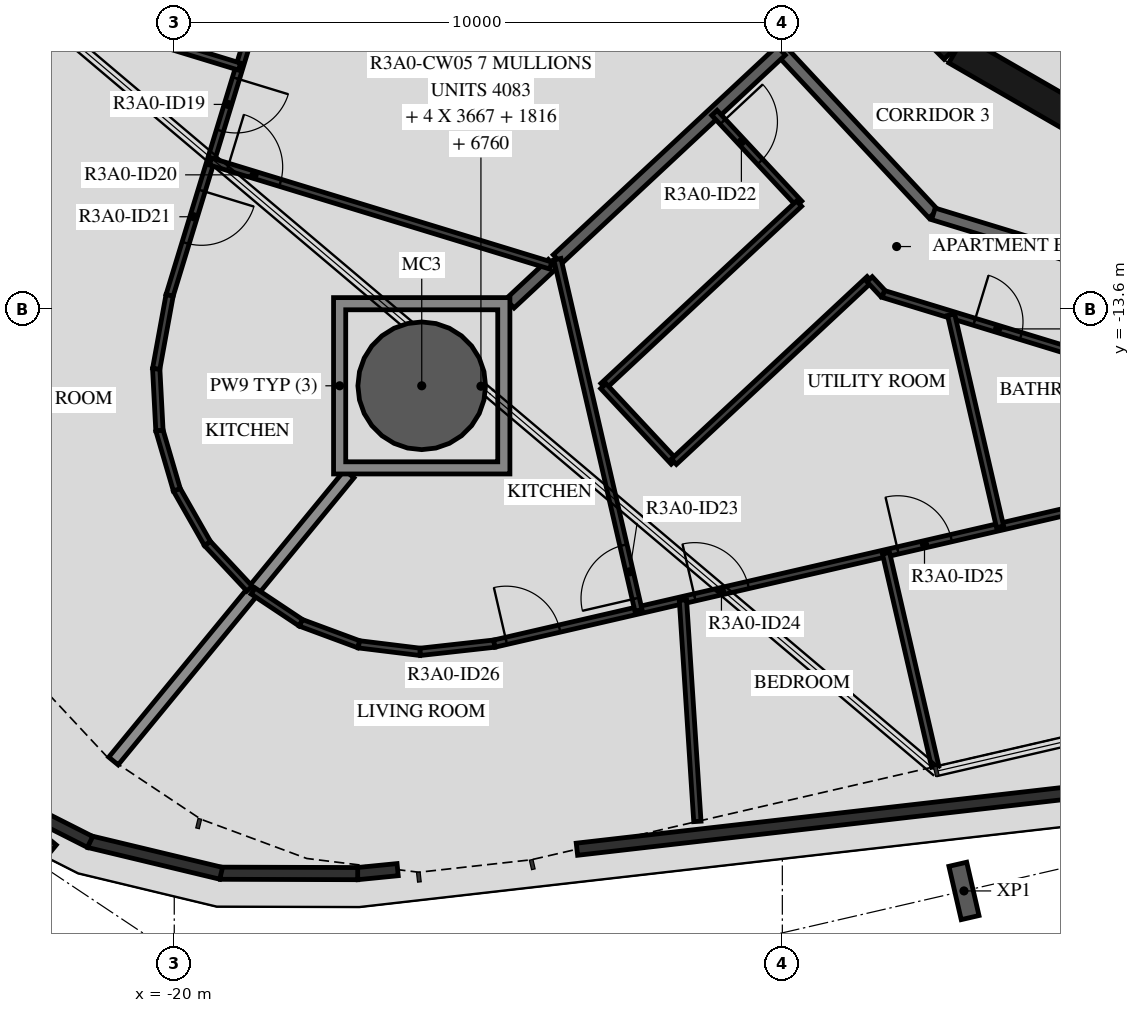
"""IFC4 building model, lengths in metres.
Left out: names, types, materials, properties, quantities, classifications, styles, units other than length and angle.
Written with IfcOpenShell. Run it as: python <this file> out.ifc"""

import sys

from ifc_helpers import new_model, si_unit, direction, frame, frame_2d, origin, origin_2d, place, context, subcontext, project, spatial, polyline, rectangle, hollow_circle, i_section, outline, extrude, element, fill, save


model = new_model("IFC4")
c1 = context("Model", 3, precision=1e-05, world=origin(), true_north=direction((0.0, 1.0)))
c2 = subcontext(c1, "Body", "Model", "MODEL_VIEW")
j1 = project(units=[si_unit("LENGTHUNIT", "METRE"), si_unit("PLANEANGLEUNIT", "RADIAN")], contexts=[c1])
p1 = place(None, origin())
s1 = spatial("IfcSite", under=j1, at=p1, CompositionType="ELEMENT")
p2 = place(p1, origin())
s2 = spatial("IfcBuilding", under=s1, at=p2, CompositionType="ELEMENT")
p3 = place(p2, frame((0.0, 0.0, 113.4)))
s3 = spatial("IfcBuildingStorey", under=s2, at=p3, CompositionType="ELEMENT", Elevation=113.4)
p4 = place(p3, frame((-15.93, -14.855, -0.45), z_axis=(0.0, 0.0, 1.0), x_axis=(1.0, 0.0, 0.0)))
e1 = element("IfcColumn", 1, at=p4, inside=s3, PredefinedType="COLUMN", context=c2, shape_type="SweptSolid", body=[
    extrude(hollow_circle(Radius=1.05, WallThickness=0.05, at=origin_2d()), origin(), (0.0, 0.0, 1.0), 3.57),
])
for number, where, z_axis, x_axis in (
    (2, (-22.342, -22.659, -0.45), (0.0, 0.0, 1.0), (-0.773, 0.635, 0.0)),
    (3, (-7.013, -23.162, -0.45), (0.0, 0.0, 1.0), (-0.974, -0.225, 0.0)),
):
    element("IfcColumn", number, at=place(p3, frame(where, z_axis=z_axis, x_axis=x_axis)), inside=s3, PredefinedType="COLUMN", context=c2, shape_type="SweptSolid", body=[
        extrude(i_section(OverallWidth=0.3, OverallDepth=0.9, WebThickness=0.019, FlangeThickness=0.035, FilletRadius=0.03, at=origin_2d()), origin(), (0.0, 0.0, 1.0), 3.57),
    ])
p5 = place(p3, frame((2.355, -20.674, 0.03), z_axis=(0.0, 0.0, 1.0), x_axis=(-0.993501379632, -0.11382007147, 0.0)))
e4 = element("IfcWall", 4, at=p5, inside=s3, PredefinedType="PARAPET", context=c2, shape_type="SweptSolid", body=[
    extrude(rectangle(XDim=15.836, YDim=0.2, at=frame_2d((7.918, 0.0))), origin(), (0.0, 0.0, 1.0), 1.5),
])
p6 = place(p3, frame((-16.326, -22.812, 0.03), z_axis=(0.0, 0.0, 1.0), x_axis=(-0.99511679477, -0.09870443134, 0.0)))
e5 = element("IfcWall", 5, at=p6, inside=s3, PredefinedType="PARAPET", context=c2, shape_type="SweptSolid", body=[
    extrude(rectangle(XDim=0.665, YDim=0.2, at=frame_2d((0.333, 0.0))), origin(), (0.0, 0.0, 1.0), 1.5),
])
p7 = place(p3, frame((-16.983, -22.877, 0.03), z_axis=(0.0, 0.0, 1.0), x_axis=(-0.999995735374, 0.002920485111, 0.0)))
e6 = element("IfcWall", 6, at=p7, inside=s3, PredefinedType="PARAPET", context=c2, shape_type="SweptSolid", body=[
    extrude(rectangle(XDim=2.257, YDim=0.2, at=frame_2d((1.128, 0.0))), origin(), (0.0, 0.0, 1.0), 1.5),
])
p8 = place(p3, frame((-19.229, -22.872, 0.03), z_axis=(0.0, 0.0, 1.0), x_axis=(-0.972356460367, 0.233501421799, 0.0)))
e7 = element("IfcWall", 7, at=p8, inside=s3, PredefinedType="PARAPET", context=c2, shape_type="SweptSolid", body=[
    extrude(rectangle(XDim=2.228, YDim=0.2, at=frame_2d((1.114, 0.0))), origin(), (0.0, 0.0, 1.0), 1.5),
])
p9 = place(p3, frame((-21.385, -22.356, 0.03), z_axis=(0.0, 0.0, 1.0), x_axis=(-0.892313608927, 0.451416020233, 0.0)))
e8 = element("IfcWall", 8, at=p9, inside=s3, PredefinedType="PARAPET", context=c2, shape_type="SweptSolid", body=[
    extrude(rectangle(XDim=2.228, YDim=0.2, at=frame_2d((1.114, 0.0))), origin(), (0.0, 0.0, 1.0), 1.5),
])
p10 = place(p3, frame((-26.845, -9.558, 0.03), z_axis=(0.0, 0.0, 1.0), x_axis=(0.398491196924, 0.917172157217, 0.0)))
e9 = element("IfcWall", 9, at=p10, inside=s3, PredefinedType="PARAPET", context=c2, shape_type="SweptSolid", body=[
    extrude(rectangle(XDim=35.306, YDim=0.2, at=frame_2d((17.653, 0.0))), origin(), (0.0, 0.0, 1.0), 1.5),
])
p11 = place(p3, frame((-9.308, -7.164, 0.0), z_axis=(0.0, 0.0, 1.0), x_axis=(0.707106781187, -0.707106781187, 0.0)))
e10 = element("IfcWall", 10, at=p11, inside=s3, PredefinedType="SHEAR", context=c2, shape_type="SweptSolid", body=[
    extrude(rectangle(XDim=3.032, YDim=0.5, at=frame_2d((1.516, 0.0))), origin(), (0.0, 0.0, 1.0), 3.12),
])
p12 = place(p3, frame((-7.137, -9.329, 0.0), z_axis=(0.0, 0.0, 1.0), x_axis=(0.865975092491, -0.500087131594, 0.0)))
e11 = element("IfcWall", 11, at=p12, inside=s3, PredefinedType="SHEAR", context=c2, shape_type="SweptSolid", body=[
    extrude(rectangle(XDim=3.033, YDim=0.5, at=frame_2d((1.516, 0.0))), origin(), (0.0, 0.0, 1.0), 3.12),
])
p13 = place(p3, frame((-12.523, -6.659, 0.0), z_axis=(0.0, 0.0, 1.0), x_axis=(0.682001841105, -0.731350455479, 0.0)))
e12 = element("IfcWall", 12, at=p13, inside=s3, PredefinedType="STANDARD", context=c2, shape_type="SweptSolid", body=[
    extrude(rectangle(XDim=7.342, YDim=0.2, at=frame_2d((3.671, 0.0))), origin(), (0.0, 0.0, 1.0), 3.12),
])
p14 = place(p3, frame((-7.516, -12.028, 0.0), z_axis=(0.0, 0.0, 1.0), x_axis=(0.956306642771, -0.292365533182, 0.0)))
e13 = element("IfcWall", 13, at=p14, inside=s3, PredefinedType="STANDARD", context=c2, shape_type="SweptSolid", body=[
    extrude(rectangle(XDim=7.342, YDim=0.2, at=frame_2d((3.671, 0.0))), origin(), (0.0, 0.0, 1.0), 3.12),
])
p15 = place(p14, frame((5.745, 0.0, 0.0)))
e14 = element("IfcOpeningElement", 14, at=p15, cuts=e13, PredefinedType="OPENING", context=c2, shape_type="SweptSolid", body=[
    extrude(rectangle(XDim=1.0, YDim=2.1, at=frame_2d((0.5, 1.05))), frame((0.0, 0.11, 0.0), z_axis=(0.0, -1.0, 0.0), x_axis=(1.0, 0.0, 0.0)), (0.0, 0.0, 1.0), 0.22),
])
p16 = place(p3, frame((-13.699, -12.774, 0.0), z_axis=(0.0, 0.0, 1.0), x_axis=(0.731353758457, 0.681998299111, 0.0)))
e15 = element("IfcWall", 15, at=p16, inside=s3, PredefinedType="STANDARD", context=c2, shape_type="SweptSolid", body=[
    extrude(rectangle(XDim=5.031, YDim=0.2, at=frame_2d((2.515, 0.0))), origin(), (0.0, 0.0, 1.0), 3.12),
])
p17 = place(p3, frame((-21.0, -21.025, 0.0), z_axis=(0.0, 0.0, 1.0), x_axis=(0.634846795952, 0.772638043116, 0.0)))
e16 = element("IfcWall", 16, at=p17, inside=s3, PredefinedType="STANDARD", context=c2, shape_type="SweptSolid", body=[
    extrude(rectangle(XDim=6.109, YDim=0.2, at=frame_2d((3.055, 0.0))), origin(), (0.0, 0.0, 1.0), 2.73),
])
p18 = place(p3, frame((-14.48, -13.503, 0.0), z_axis=(0.0, 0.0, 1.0), x_axis=(0.73152991834, 0.681809341806, 0.0)))
e17 = element("IfcWall", 17, at=p18, inside=s3, PredefinedType="STANDARD", context=c2, shape_type="SweptSolid", body=[
    extrude(rectangle(XDim=0.958, YDim=0.2, at=frame_2d((0.479, 0.0))), origin(), (0.0, 0.0, 1.0), 3.12),
])
p19 = place(p3, frame((-16.579, -1.928, 0.0), z_axis=(0.0, 0.0, 1.0), x_axis=(-0.29236733738, -0.956306091183, 0.0)))
e18 = element("IfcWall", 18, at=p19, inside=s3, PredefinedType="PARTITIONING", context=c2, shape_type="SweptSolid", body=[
    extrude(rectangle(XDim=11.963, YDim=0.12, at=frame_2d((5.981, 0.0))), origin(), (0.0, 0.0, 1.0), 3.12),
])
p20 = place(p19, frame((3.271, 0.0, 0.0)))
e19 = element("IfcOpeningElement", 19, at=p20, cuts=e18, PredefinedType="OPENING", context=c2, shape_type="SweptSolid", body=[
    extrude(rectangle(XDim=0.9, YDim=2.1, at=frame_2d((0.45, 1.05))), frame((0.0, 0.07, 0.0), z_axis=(0.0, -1.0, 0.0), x_axis=(1.0, 0.0, 0.0)), (0.0, 0.0, 1.0), 0.14),
])
p21 = place(p19, frame((8.229, 0.0, 0.0)))
e20 = element("IfcOpeningElement", 20, at=p21, cuts=e18, PredefinedType="OPENING", context=c2, shape_type="SweptSolid", body=[
    extrude(rectangle(XDim=0.9, YDim=2.1, at=frame_2d((0.45, 1.05))), frame((0.0, 0.07, 0.0), z_axis=(0.0, -1.0, 0.0), x_axis=(1.0, 0.0, 0.0)), (0.0, 0.0, 1.0), 0.14),
])
p22 = place(p19, frame((10.161, 0.0, 0.0)))
e21 = element("IfcOpeningElement", 21, at=p22, cuts=e18, PredefinedType="OPENING", context=c2, shape_type="SweptSolid", body=[
    extrude(rectangle(XDim=0.9, YDim=2.1, at=frame_2d((0.45, 1.05))), frame((0.0, 0.07, 0.0), z_axis=(0.0, -1.0, 0.0), x_axis=(1.0, 0.0, 0.0)), (0.0, 0.0, 1.0), 0.14),
])
p23 = place(p3, frame((-19.404, -11.167, 0.0), z_axis=(0.0, 0.0, 1.0), x_axis=(0.956314306829, -0.292340463423, 0.0)))
e22 = element("IfcWall", 22, at=p23, inside=s3, PredefinedType="PARTITIONING", context=c2, shape_type="SweptSolid", body=[
    extrude(rectangle(XDim=5.85, YDim=0.12, at=frame_2d((2.925, 0.0))), origin(), (0.0, 0.0, 1.0), 3.12),
])
p24 = place(p23, frame((0.3, 0.0, 0.0)))
e23 = element("IfcOpeningElement", 23, at=p24, cuts=e22, PredefinedType="OPENING", context=c2, shape_type="SweptSolid", body=[
    extrude(rectangle(XDim=0.9, YDim=2.1, at=frame_2d((0.45, 1.05))), frame((0.0, 0.07, 0.0), z_axis=(0.0, -1.0, 0.0), x_axis=(1.0, 0.0, 0.0)), (0.0, 0.0, 1.0), 0.14),
])
p25 = place(p3, frame((-22.369, -8.554, 0.0), z_axis=(0.0, 0.0, 1.0), x_axis=(0.956306810244, -0.292364985388, 0.0)))
e24 = element("IfcWall", 24, at=p25, inside=s3, PredefinedType="PARTITIONING", context=c2, shape_type="SweptSolid", body=[
    extrude(rectangle(XDim=3.6, YDim=0.12, at=frame_2d((1.8, 0.0))), origin(), (0.0, 0.0, 1.0), 2.73),
])
for number, where, z_axis, x_axis in (
    (25, (-18.762, -18.19, 0.0), (0.0, 0.0, 1.0), (-0.682, 0.731, 0.0)),
    (26, (-19.455, -17.448, 0.0), (0.0, 0.0, 1.0), (-0.495, 0.869, 0.0)),
    (27, (-19.958, -16.565, 0.0), (0.0, 0.0, 1.0), (-0.281, 0.96, 0.0)),
):
    element("IfcWall", number, at=place(p3, frame(where, z_axis=z_axis, x_axis=x_axis)), inside=s3, PredefinedType="PARTITIONING", context=c2, shape_type="SweptSolid", body=[
        extrude(rectangle(XDim=1.016, YDim=0.12, at=frame_2d((0.508, 0.0))), origin(), (0.0, 0.0, 1.0), 3.12),
    ])
p26 = place(p3, frame((-20.244, -15.59, 0.0), z_axis=(0.0, 0.0, 1.0), x_axis=(-0.052142637988, 0.998639647372, 0.0)))
e28 = element("IfcWall", 28, at=p26, inside=s3, PredefinedType="PARTITIONING", context=c2, shape_type="SweptSolid", body=[
    extrude(rectangle(XDim=1.016, YDim=0.12, at=frame_2d((0.508, 0.0))), origin(), (0.0, 0.0, 1.0), 3.12),
])
p27 = place(p3, frame((-20.297, -14.575, 0.0), z_axis=(0.0, 0.0, 1.0), x_axis=(0.179288174895, 0.983796600087, 0.0)))
e29 = element("IfcWall", 29, at=p27, inside=s3, PredefinedType="PARTITIONING", context=c2, shape_type="SweptSolid", body=[
    extrude(rectangle(XDim=1.227, YDim=0.12, at=frame_2d((0.613, 0.0))), origin(), (0.0, 0.0, 1.0), 3.12),
])
p28 = place(p3, frame((-11.117, -10.366, 0.0), z_axis=(0.0, 0.0, 1.0), x_axis=(0.682041233274, -0.731313719353, 0.0)))
e30 = element("IfcWall", 30, at=p28, inside=s3, PredefinedType="PARTITIONING", context=c2, shape_type="SweptSolid", body=[
    extrude(rectangle(XDim=2.042, YDim=0.12, at=frame_2d((1.021, 0.0))), origin(), (0.0, 0.0, 1.0), 3.12),
])
p29 = place(p28, frame((0.2, 0.0, 0.0)))
e31 = element("IfcOpeningElement", 31, at=p29, cuts=e30, PredefinedType="OPENING", context=c2, shape_type="SweptSolid", body=[
    extrude(rectangle(XDim=0.9, YDim=2.1, at=frame_2d((0.45, 1.05))), frame((0.0, 0.07, 0.0), z_axis=(0.0, -1.0, 0.0), x_axis=(1.0, 0.0, 0.0)), (0.0, 0.0, 1.0), 0.14),
])
p30 = place(p3, frame((-9.724, -11.859, 0.0), z_axis=(0.0, 0.0, 1.0), x_axis=(-0.731365154613, -0.681986078023, 0.0)))
e32 = element("IfcWall", 32, at=p30, inside=s3, PredefinedType="PARTITIONING", context=c2, shape_type="SweptSolid", body=[
    extrude(rectangle(XDim=4.4, YDim=0.12, at=frame_2d((2.2, 0.0))), origin(), (0.0, 0.0, 1.0), 3.12),
])
p31 = place(p3, frame((-12.943, -14.86, 0.0), z_axis=(0.0, 0.0, 1.0), x_axis=(0.682046998737, -0.731308342297, 0.0)))
e33 = element("IfcWall", 33, at=p31, inside=s3, PredefinedType="PARTITIONING", context=c2, shape_type="SweptSolid", body=[
    extrude(rectangle(XDim=1.7, YDim=0.12, at=frame_2d((0.85, 0.0))), origin(), (0.0, 0.0, 1.0), 3.12),
])
p32 = place(p3, frame((-11.783, -16.104, 0.0), z_axis=(0.0, 0.0, 1.0), x_axis=(0.731365154613, 0.681986078023, 0.0)))
e34 = element("IfcWall", 34, at=p32, inside=s3, PredefinedType="PARTITIONING", context=c2, shape_type="SweptSolid", body=[
    extrude(rectangle(XDim=4.4, YDim=0.12, at=frame_2d((2.2, 0.0))), origin(), (0.0, 0.0, 1.0), 3.12),
])
p33 = place(p3, frame((-8.565, -13.103, 0.0), z_axis=(0.0, 0.0, 1.0), x_axis=(0.681636048219, -0.731691395172, 0.0)))
e35 = element("IfcWall", 35, at=p33, inside=s3, PredefinedType="PARTITIONING", context=c2, shape_type="SweptSolid", body=[
    extrude(rectangle(XDim=0.332, YDim=0.12, at=frame_2d((0.166, 0.0))), origin(), (0.0, 0.0, 1.0), 3.12),
])
p34 = place(p3, frame((-8.339, -13.345, 0.0), z_axis=(0.0, 0.0, 1.0), x_axis=(0.956310145342, -0.292354076276, 0.0)))
e36 = element("IfcWall", 36, at=p34, inside=s3, PredefinedType="PARTITIONING", context=c2, shape_type="SweptSolid", body=[
    extrude(rectangle(XDim=8.146, YDim=0.12, at=frame_2d((4.073, 0.0))), origin(), (0.0, 0.0, 1.0), 3.12),
])
p35 = place(p34, frame((1.565, 0.0, 0.0)))
e37 = element("IfcOpeningElement", 37, at=p35, cuts=e36, PredefinedType="OPENING", context=c2, shape_type="SweptSolid", body=[
    extrude(rectangle(XDim=0.8, YDim=2.1, at=frame_2d((0.4, 1.05))), frame((0.0, 0.07, 0.0), z_axis=(0.0, -1.0, 0.0), x_axis=(1.0, 0.0, 0.0)), (0.0, 0.0, 1.0), 0.14),
])
p36 = place(p3, frame((-18.703, -18.23, 0.0), z_axis=(0.0, 0.0, 1.0), x_axis=(0.832328473933, -0.554282699965, 0.0)))
e38 = element("IfcWall", 38, at=p36, inside=s3, PredefinedType="PARTITIONING", context=c2, shape_type="SweptSolid", body=[
    extrude(rectangle(XDim=0.945, YDim=0.12, at=frame_2d((0.472, 0.0))), origin(), (0.0, 0.0, 1.0), 3.12),
])
p37 = place(p3, frame((-17.917, -18.754, 0.0), z_axis=(0.0, 0.0, 1.0), x_axis=(0.937684971769, -0.347486537462, 0.0)))
e39 = element("IfcWall", 39, at=p37, inside=s3, PredefinedType="PARTITIONING", context=c2, shape_type="SweptSolid", body=[
    extrude(rectangle(XDim=1.016, YDim=0.12, at=frame_2d((0.508, 0.0))), origin(), (0.0, 0.0, 1.0), 3.12),
])
p38 = place(p3, frame((-16.964, -19.107, 0.0), z_axis=(0.0, 0.0, 1.0), x_axis=(0.992523553766, -0.122053247474, 0.0)))
e40 = element("IfcWall", 40, at=p38, inside=s3, PredefinedType="PARTITIONING", context=c2, shape_type="SweptSolid", body=[
    extrude(rectangle(XDim=1.016, YDim=0.12, at=frame_2d((0.508, 0.0))), origin(), (0.0, 0.0, 1.0), 3.12),
])
p39 = place(p3, frame((-15.956, -19.231, 0.0), z_axis=(0.0, 0.0, 1.0), x_axis=(0.993883734674, 0.110431526075, 0.0)))
e41 = element("IfcWall", 41, at=p39, inside=s3, PredefinedType="PARTITIONING", context=c2, shape_type="SweptSolid", body=[
    extrude(rectangle(XDim=1.227, YDim=0.12, at=frame_2d((0.614, 0.0))), origin(), (0.0, 0.0, 1.0), 3.12),
])
p40 = place(p3, frame((-14.736, -19.095, 0.0), z_axis=(0.0, 0.0, 1.0), x_axis=(0.974369132722, 0.224955091516, 0.0)))
e42 = element("IfcWall", 42, at=p40, inside=s3, PredefinedType="PARTITIONING", context=c2, shape_type="SweptSolid", body=[
    extrude(rectangle(XDim=18.654, YDim=0.12, at=frame_2d((9.327, 0.0))), origin(), (0.0, 0.0, 1.0), 3.12),
])
p41 = place(p40, frame((3.383, 0.0, 0.0)))
e43 = element("IfcOpeningElement", 43, at=p41, cuts=e42, PredefinedType="OPENING", context=c2, shape_type="SweptSolid", body=[
    extrude(rectangle(XDim=0.9, YDim=2.1, at=frame_2d((0.45, 1.05))), frame((0.0, 0.07, 0.0), z_axis=(0.0, -1.0, 0.0), x_axis=(1.0, 0.0, 0.0)), (0.0, 0.0, 1.0), 0.14),
])
p42 = place(p40, frame((6.81, 0.0, 0.0)))
e44 = element("IfcOpeningElement", 44, at=p42, cuts=e42, PredefinedType="OPENING", context=c2, shape_type="SweptSolid", body=[
    extrude(rectangle(XDim=0.9, YDim=2.1, at=frame_2d((0.45, 1.05))), frame((0.0, 0.07, 0.0), z_axis=(0.0, -1.0, 0.0), x_axis=(1.0, 0.0, 0.0)), (0.0, 0.0, 1.0), 0.14),
])
p43 = place(p40, frame((0.2, 0.0, 0.0)))
e45 = element("IfcOpeningElement", 45, at=p43, cuts=e42, PredefinedType="OPENING", context=c2, shape_type="SweptSolid", body=[
    extrude(rectangle(XDim=0.9, YDim=2.1, at=frame_2d((0.45, 1.05))), frame((0.0, 0.07, 0.0), z_axis=(0.0, -1.0, 0.0), x_axis=(1.0, 0.0, 0.0)), (0.0, 0.0, 1.0), 0.14),
])
p44 = place(p40, frame((14.839, 0.0, 0.0)))
e46 = element("IfcOpeningElement", 46, at=p44, cuts=e42, PredefinedType="OPENING", context=c2, shape_type="SweptSolid", body=[
    extrude(rectangle(XDim=0.9, YDim=2.1, at=frame_2d((0.45, 1.05))), frame((0.0, 0.07, 0.0), z_axis=(0.0, -1.0, 0.0), x_axis=(1.0, 0.0, 0.0)), (0.0, 0.0, 1.0), 0.14),
])
p45 = place(p3, frame((-12.366, -18.548, 0.0), z_axis=(0.0, 0.0, 1.0), x_axis=(-0.224958805164, 0.974368275335, 0.0)))
e47 = element("IfcWall", 47, at=p45, inside=s3, PredefinedType="PARTITIONING", context=c2, shape_type="SweptSolid", body=[
    extrude(rectangle(XDim=5.926, YDim=0.12, at=frame_2d((2.963, 0.0))), origin(), (0.0, 0.0, 1.0), 3.12),
])
p46 = place(p45, frame((0.2, 0.0, 0.0)))
e48 = element("IfcOpeningElement", 48, at=p46, cuts=e47, PredefinedType="OPENING", context=c2, shape_type="SweptSolid", body=[
    extrude(rectangle(XDim=0.9, YDim=2.1, at=frame_2d((0.45, 1.05))), frame((0.0, 0.07, 0.0), z_axis=(0.0, -1.0, 0.0), x_axis=(1.0, 0.0, 0.0)), (0.0, 0.0, 1.0), 0.14),
])
p47 = place(p3, frame((-11.397, -22.019, 0.0), z_axis=(0.0, 0.0, 1.0), x_axis=(-0.065124052048, 0.997877175731, 0.0)))
e49 = element("IfcWall", 49, at=p47, inside=s3, PredefinedType="PARTITIONING", context=c2, shape_type="SweptSolid", body=[
    extrude(rectangle(XDim=3.648, YDim=0.12, at=frame_2d((1.824, 0.0))), origin(), (0.0, 0.0, 1.0), 3.12),
])
p48 = place(p3, frame((-6.419, -17.175, 0.0), z_axis=(0.0, 0.0, 1.0), x_axis=(-0.224979003559, 0.974363611778, 0.0)))
e50 = element("IfcWall", 50, at=p48, inside=s3, PredefinedType="PARTITIONING", context=c2, shape_type="SweptSolid", body=[
    extrude(rectangle(XDim=3.581, YDim=0.12, at=frame_2d((1.791, 0.0))), origin(), (0.0, 0.0, 1.0), 3.12),
])
p49 = place(p3, frame((-7.486, -21.116, 0.0), z_axis=(0.0, 0.0, 1.0), x_axis=(-0.224943703639, 0.9743717618, 0.0)))
e51 = element("IfcWall", 51, at=p49, inside=s3, PredefinedType="PARTITIONING", context=c2, shape_type="SweptSolid", body=[
    extrude(rectangle(XDim=3.6, YDim=0.12, at=frame_2d((1.8, 0.0))), origin(), (0.0, 0.0, 1.0), 2.73),
])
p50 = place(p3, origin())
e52 = element("IfcWall", 52, at=p50, inside=s3, PredefinedType="STANDARD", context=c2, shape_type="SweptSolid", body=[
    extrude(outline(polyline([(-14.48, -13.405), (-14.48, -16.305), (-17.38, -16.305), (-17.38, -13.405), (-14.48, -13.405)]), holes=[polyline([(-17.18, -16.105), (-14.68, -16.105), (-14.68, -13.605), (-17.18, -13.605), (-17.18, -16.105)])]), origin(), (0.0, 0.0, 1.0), 3.12),
])
p51 = place(p21, origin())
e53 = element("IfcDoor", 53, at=p51, inside=s3, OperationType="SINGLE_SWING_RIGHT", PredefinedType="DOOR", context=c2, shape_type="SweptSolid", body=[
    extrude(rectangle(XDim=0.9, YDim=2.1, at=frame_2d((0.45, 1.05))), frame((0.0, 0.025, 0.0), z_axis=(0.0, -1.0, 0.0), x_axis=(1.0, 0.0, 0.0)), (0.0, 0.0, 1.0), 0.05),
])
fill(e20, e53)
p52 = place(p24, origin())
e54 = element("IfcDoor", 54, at=p52, inside=s3, OperationType="SINGLE_SWING_RIGHT", PredefinedType="DOOR", context=c2, shape_type="SweptSolid", body=[
    extrude(rectangle(XDim=0.9, YDim=2.1, at=frame_2d((0.45, 1.05))), frame((0.0, 0.025, 0.0), z_axis=(0.0, -1.0, 0.0), x_axis=(1.0, 0.0, 0.0)), (0.0, 0.0, 1.0), 0.05),
])
fill(e23, e54)
p53 = place(p22, origin())
e55 = element("IfcDoor", 55, at=p53, inside=s3, OperationType="SINGLE_SWING_LEFT", PredefinedType="DOOR", context=c2, shape_type="SweptSolid", body=[
    extrude(rectangle(XDim=0.9, YDim=2.1, at=frame_2d((0.45, 1.05))), frame((0.0, 0.025, 0.0), z_axis=(0.0, -1.0, 0.0), x_axis=(1.0, 0.0, 0.0)), (0.0, 0.0, 1.0), 0.05),
])
fill(e21, e55)
p54 = place(p29, origin())
e56 = element("IfcDoor", 56, at=p54, inside=s3, OperationType="SINGLE_SWING_LEFT", PredefinedType="DOOR", context=c2, shape_type="SweptSolid", body=[
    extrude(rectangle(XDim=0.9, YDim=2.1, at=frame_2d((0.45, 1.05))), frame((0.0, 0.025, 0.0), z_axis=(0.0, -1.0, 0.0), x_axis=(1.0, 0.0, 0.0)), (0.0, 0.0, 1.0), 0.05),
])
fill(e31, e56)
p55 = place(p35, origin())
e57 = element("IfcDoor", 57, at=p55, inside=s3, OperationType="SINGLE_SWING_LEFT", PredefinedType="DOOR", context=c2, shape_type="SweptSolid", body=[
    extrude(rectangle(XDim=0.8, YDim=2.1, at=frame_2d((0.4, 1.05))), frame((0.0, 0.025, 0.0), z_axis=(0.0, -1.0, 0.0), x_axis=(1.0, 0.0, 0.0)), (0.0, 0.0, 1.0), 0.05),
])
fill(e37, e57)
p56 = place(p46, origin())
e58 = element("IfcDoor", 58, at=p56, inside=s3, OperationType="SINGLE_SWING_LEFT", PredefinedType="DOOR", context=c2, shape_type="SweptSolid", body=[
    extrude(rectangle(XDim=0.9, YDim=2.1, at=frame_2d((0.45, 1.05))), frame((0.0, 0.025, 0.0), z_axis=(0.0, -1.0, 0.0), x_axis=(1.0, 0.0, 0.0)), (0.0, 0.0, 1.0), 0.05),
])
fill(e48, e58)
p57 = place(p41, origin())
e59 = element("IfcDoor", 59, at=p57, inside=s3, OperationType="SINGLE_SWING_LEFT", PredefinedType="DOOR", context=c2, shape_type="SweptSolid", body=[
    extrude(rectangle(XDim=0.9, YDim=2.1, at=frame_2d((0.45, 1.05))), frame((0.0, 0.025, 0.0), z_axis=(0.0, -1.0, 0.0), x_axis=(1.0, 0.0, 0.0)), (0.0, 0.0, 1.0), 0.05),
])
fill(e43, e59)
p58 = place(p42, origin())
e60 = element("IfcDoor", 60, at=p58, inside=s3, OperationType="SINGLE_SWING_LEFT", PredefinedType="DOOR", context=c2, shape_type="SweptSolid", body=[
    extrude(rectangle(XDim=0.9, YDim=2.1, at=frame_2d((0.45, 1.05))), frame((0.0, 0.025, 0.0), z_axis=(0.0, -1.0, 0.0), x_axis=(1.0, 0.0, 0.0)), (0.0, 0.0, 1.0), 0.05),
])
fill(e44, e60)
p59 = place(p43, origin())
e61 = element("IfcDoor", 61, at=p59, inside=s3, OperationType="SINGLE_SWING_RIGHT", PredefinedType="DOOR", context=c2, shape_type="SweptSolid", body=[
    extrude(rectangle(XDim=0.9, YDim=2.1, at=frame_2d((0.45, 1.05))), frame((0.0, 0.025, 0.0), z_axis=(0.0, -1.0, 0.0), x_axis=(1.0, 0.0, 0.0)), (0.0, 0.0, 1.0), 0.05),
])
fill(e45, e61)
save(model, sys.argv[1])
